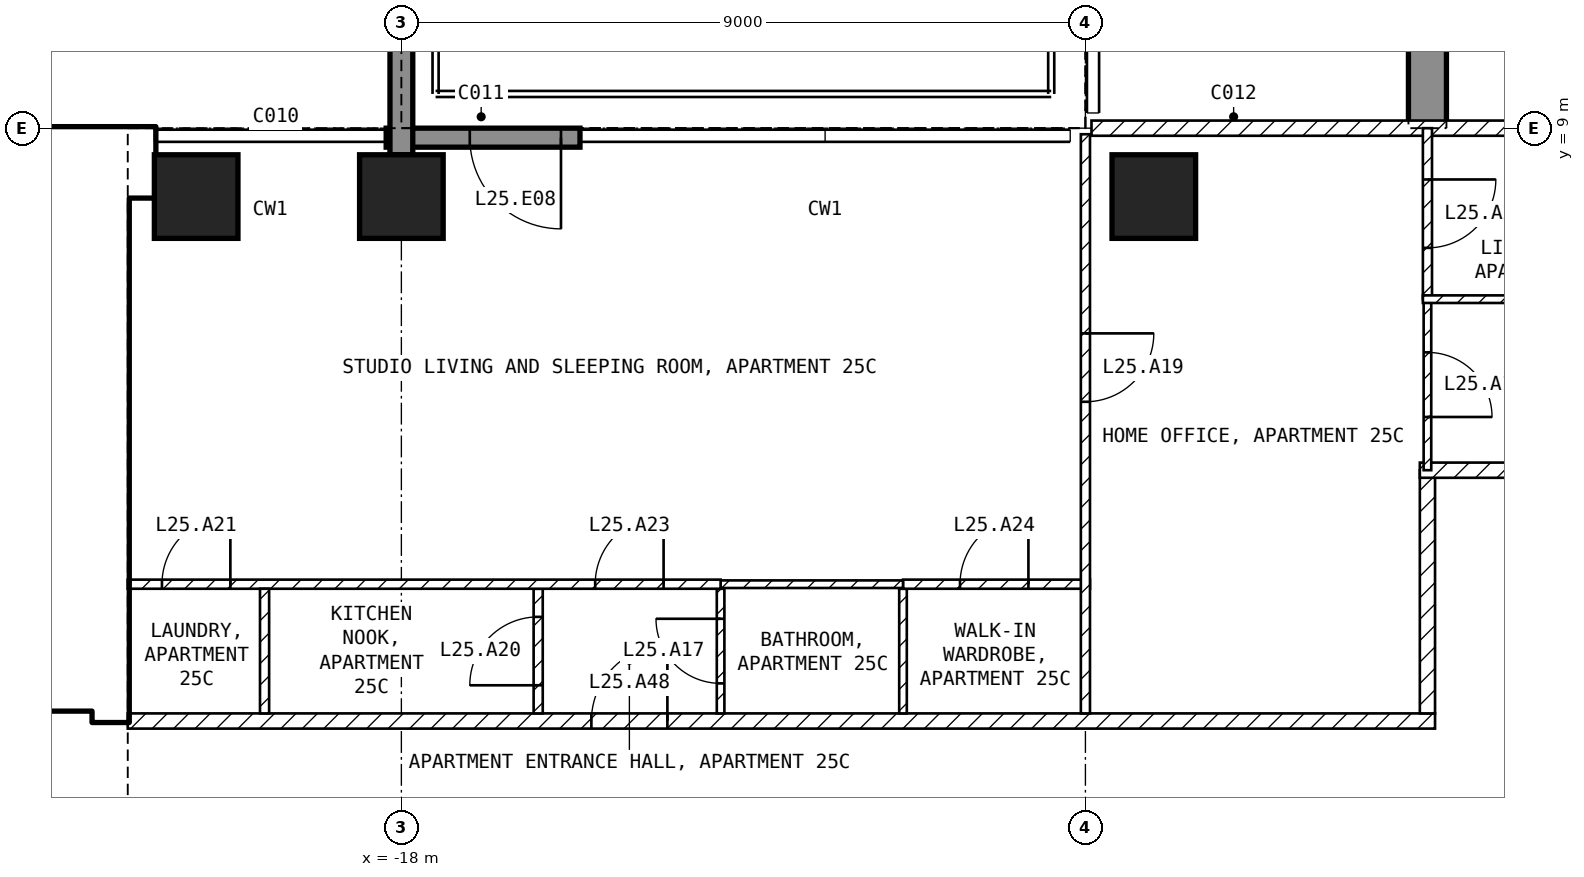
"""IFC4 building model, lengths in metres.
Left out: names, types, materials, properties, quantities, classifications, styles, units other than length and angle.
Written with IfcOpenShell. Run it as: python <this file> out.ifc"""

import sys

from ifc_helpers import new_model, si_unit, direction, frame, frame_2d, origin, origin_2d, place, context, subcontext, project, spatial, polyline, rectangle, outline, extrude, element, fill, save


model = new_model("IFC4")
c1 = context("Model", 3, precision=1e-05, world=origin(), true_north=direction((0.0, 1.0)))
c2 = subcontext(c1, "Body", "Model", "MODEL_VIEW")
j1 = project(units=[si_unit("LENGTHUNIT", "METRE"), si_unit("PLANEANGLEUNIT", "RADIAN")], contexts=[c1])
p1 = place(None, origin())
s1 = spatial("IfcSite", under=j1, at=p1, CompositionType="ELEMENT")
p2 = place(p1, origin())
s2 = spatial("IfcBuilding", under=s1, at=p2, CompositionType="ELEMENT")
p3 = place(p2, frame((0.0, 0.0, 109.4)))
s3 = spatial("IfcBuildingStorey", under=s2, at=p3, CompositionType="ELEMENT", Elevation=109.4)
for number, where, z_axis, x_axis in (
    (1, (-20.7, 8.1, -0.25), (0.0, 0.0, 1.0), (1.0, 0.0, 0.0)),
    (2, (-18.0, 8.1, -0.25), (0.0, 0.0, 1.0), (1.0, 0.0, 0.0)),
    (3, (-8.1, 8.1, -0.25), (0.0, 0.0, 1.0), (1.0, 0.0, 0.0)),
):
    element("IfcColumn", number, at=place(p3, frame(where, z_axis=z_axis, x_axis=x_axis)), inside=s3, PredefinedType="COLUMN", context=c2, shape_type="SweptSolid", body=[
        extrude(rectangle(XDim=1.1, YDim=1.1, at=origin_2d()), origin(), (0.0, 0.0, 1.0), 3.5),
    ])
p4 = place(p3, frame((-4.75, 9.0, -0.25), z_axis=(1.0, 0.0, 0.0), x_axis=(0.0, 1.0, 0.0)))
e4 = element("IfcWall", 4, at=p4, inside=s3, PredefinedType="SHEAR", context=c2, shape_type="SweptSolid", body=[
    extrude(outline(polyline([(0.0, 0.0), (2.1, 0.0), (2.1, 2.65), (4.5, 2.65), (4.5, 0.0), (9.9, 0.0), (9.9, 2.65), (12.3, 2.65), (12.3, 0.0), (16.55, 0.0), (16.55, 3.5), (0.0, 3.5), (0.0, 0.0)])), origin(), (0.0, 0.0, 1.0), 0.5),
])
p5 = place(p3, frame((-15.65, 8.875, 0.0), z_axis=(0.0, 0.0, 1.0), x_axis=(-1.0, 0.0, 0.0)))
e5 = element("IfcWall", 5, at=p5, inside=s3, PredefinedType="SOLIDWALL", context=c2, shape_type="SweptSolid", body=[
    extrude(rectangle(XDim=2.55, YDim=0.25, at=frame_2d((1.275, 0.0))), origin(), (0.0, 0.0, 1.0), 3.25),
])
p6 = place(p5, frame((0.25, 0.0, 0.0)))
e6 = element("IfcOpeningElement", 6, at=p6, cuts=e5, PredefinedType="OPENING", context=c2, shape_type="SweptSolid", body=[
    extrude(rectangle(XDim=1.2, YDim=2.4, at=frame_2d((0.6, 1.2))), frame((0.0, 0.135, 0.0), z_axis=(0.0, -1.0, 0.0), x_axis=(1.0, 0.0, 0.0)), (0.0, 0.0, 1.0), 0.27),
])
p7 = place(p3, frame((-18.0, 8.65, 0.0), z_axis=(0.0, 0.0, 1.0), x_axis=(0.0, 1.0, 0.0)))
e7 = element("IfcWall", 7, at=p7, inside=s3, PredefinedType="SOLIDWALL", context=c2, shape_type="SweptSolid", body=[
    extrude(rectangle(XDim=3.09, YDim=0.3, at=frame_2d((1.545, 0.0))), origin(), (0.0, 0.0, 1.0), 3.25),
])
p8 = place(p3, frame((-29.45, 8.55, 0.0), z_axis=(0.0, 0.0, 1.0), x_axis=(1.0, 0.0, 0.0)))
e8 = element("IfcWall", 8, at=p8, inside=s3, PredefinedType="SHEAR", context=c2, shape_type="SweptSolid", body=[
    extrude(rectangle(XDim=8.2, YDim=0.9, at=frame_2d((4.1, 0.0))), origin(), (0.0, 0.0, 1.0), 3.25),
])
p9 = place(p3, frame((-21.825, 1.2, 0.0), z_axis=(0.0, 0.0, 1.0), x_axis=(0.0, 1.0, 0.0)))
e9 = element("IfcWall", 9, at=p9, inside=s3, PredefinedType="SHEAR", context=c2, shape_type="SweptSolid", body=[
    extrude(rectangle(XDim=6.9, YDim=0.45, at=frame_2d((3.45, 0.0))), origin(), (0.0, 0.0, 1.0), 3.25),
])
p10 = place(p3, frame((-33.05, 1.45, 0.0), z_axis=(0.0, 0.0, 1.0), x_axis=(1.0, 0.0, 0.0)))
e10 = element("IfcWall", 10, at=p10, inside=s3, PredefinedType="SOLIDWALL", context=c2, shape_type="SweptSolid", body=[
    extrude(rectangle(XDim=11.0, YDim=0.2, at=frame_2d((5.5, 0.0))), origin(), (0.0, 0.0, 1.0), 3.25),
])
p11 = place(p10, frame((9.25, 0.0, 0.0)))
e11 = element("IfcOpeningElement", 11, at=p11, cuts=e10, PredefinedType="OPENING", context=c2, shape_type="SweptSolid", body=[
    extrude(rectangle(XDim=1.0, YDim=2.1, at=frame_2d((0.5, 1.05))), frame((0.0, 0.11, 0.0), z_axis=(0.0, -1.0, 0.0), x_axis=(1.0, 0.0, 0.0)), (0.0, 0.0, 1.0), 0.22),
])
p12 = place(p10, frame((6.75, 0.0, 0.0)))
e12 = element("IfcOpeningElement", 12, at=p12, cuts=e10, PredefinedType="OPENING", context=c2, shape_type="SweptSolid", body=[
    extrude(rectangle(XDim=1.0, YDim=2.1, at=frame_2d((0.5, 1.05))), frame((0.0, 0.11, 0.0), z_axis=(0.0, -1.0, 0.0), x_axis=(1.0, 0.0, 0.0)), (0.0, 0.0, 1.0), 0.22),
])
p13 = place(p10, frame((1.025, 0.0, 0.0)))
e13 = element("IfcOpeningElement", 13, at=p13, cuts=e10, PredefinedType="OPENING", context=c2, shape_type="SweptSolid", body=[
    extrude(rectangle(XDim=0.9, YDim=2.1, at=frame_2d((0.45, 1.05))), frame((0.0, 0.11, 0.0), z_axis=(0.0, -1.0, 0.0), x_axis=(1.0, 0.0, 0.0)), (0.0, 0.0, 1.0), 0.22),
])
p14 = place(p3, frame((-28.35, 5.15, 0.0), z_axis=(0.0, 0.0, 1.0), x_axis=(1.0, 0.0, 0.0)))
e14 = element("IfcWall", 14, at=p14, inside=s3, PredefinedType="SOLIDWALL", context=c2, shape_type="SweptSolid", body=[
    extrude(rectangle(XDim=6.3, YDim=0.2, at=frame_2d((3.15, 0.0))), origin(), (0.0, 0.0, 1.0), 3.25),
])
p15 = place(p14, frame((5.1, 0.0, 0.0)))
e15 = element("IfcOpeningElement", 15, at=p15, cuts=e14, PredefinedType="OPENING", context=c2, shape_type="SweptSolid", body=[
    extrude(rectangle(XDim=1.0, YDim=2.1, at=frame_2d((0.5, 1.05))), frame((0.0, 0.11, 0.0), z_axis=(0.0, -1.0, 0.0), x_axis=(1.0, 0.0, 0.0)), (0.0, 0.0, 1.0), 0.22),
])
p16 = place(p3, frame((-21.6, 1.2, 0.0), z_axis=(0.0, 0.0, 1.0), x_axis=(1.0, 0.0, 0.0)))
e16 = element("IfcWall", 16, at=p16, inside=s3, PredefinedType="PARTITIONING", context=c2, shape_type="SweptSolid", body=[
    extrude(rectangle(XDim=17.2, YDim=0.2, at=frame_2d((8.6, 0.0))), origin(), (0.0, 0.0, 1.0), 3.25),
])
p17 = place(p16, frame((6.1, 0.0, 0.0)))
e17 = element("IfcOpeningElement", 17, at=p17, cuts=e16, PredefinedType="OPENING", context=c2, shape_type="SweptSolid", body=[
    extrude(rectangle(XDim=1.0, YDim=2.1, at=frame_2d((0.5, 1.05))), frame((0.0, 0.11, 0.0), z_axis=(0.0, -1.0, 0.0), x_axis=(1.0, 0.0, 0.0)), (0.0, 0.0, 1.0), 0.22),
])
p18 = place(p3, frame((-4.5, 1.3, 0.0), z_axis=(0.0, 0.0, 1.0), x_axis=(0.0, 1.0, 0.0)))
e18 = element("IfcWall", 18, at=p18, inside=s3, PredefinedType="PARTITIONING", context=c2, shape_type="SweptSolid", body=[
    extrude(rectangle(XDim=3.2, YDim=0.2, at=frame_2d((1.6, 0.0))), origin(), (0.0, 0.0, 1.0), 3.25),
])
p19 = place(p3, frame((-4.6, 4.5, 0.0), z_axis=(0.0, 0.0, 1.0), x_axis=(1.0, 0.0, 0.0)))
e19 = element("IfcWall", 19, at=p19, inside=s3, PredefinedType="PARTITIONING", context=c2, shape_type="SweptSolid", body=[
    extrude(rectangle(XDim=3.5, YDim=0.2, at=frame_2d((1.75, 0.0))), origin(), (0.0, 0.0, 1.0), 3.25),
])
p20 = place(p3, frame((-8.92, 9.0, 0.0), z_axis=(0.0, 0.0, 1.0), x_axis=(1.0, 0.0, 0.0)))
e20 = element("IfcWall", 20, at=p20, inside=s3, PredefinedType="PARTITIONING", context=c2, shape_type="SweptSolid", body=[
    extrude(rectangle(XDim=17.84, YDim=0.2, at=frame_2d((8.92, 0.0))), origin(), (0.0, 0.0, 1.0), 3.25),
])
p21 = place(p20, frame((8.42, 0.0, 0.0)))
e21 = element("IfcOpeningElement", 21, at=p21, cuts=e20, PredefinedType="OPENING", context=c2, shape_type="SweptSolid", body=[
    extrude(rectangle(XDim=1.0, YDim=2.1, at=frame_2d((0.5, 1.05))), frame((0.0, 0.11, 0.0), z_axis=(0.0, -1.0, 0.0), x_axis=(1.0, 0.0, 0.0)), (0.0, 0.0, 1.0), 0.22),
])
p22 = place(p3, frame((-11.4, 1.3, 0.0), z_axis=(0.0, 0.0, 1.0), x_axis=(0.0, 1.0, 0.0)))
e22 = element("IfcWall", 22, at=p22, inside=s3, PredefinedType="PARTITIONING", context=c2, shape_type="SweptSolid", body=[
    extrude(rectangle(XDim=1.64, YDim=0.1, at=frame_2d((0.82, 0.0))), origin(), (0.0, 0.0, 1.0), 3.25),
])
p23 = place(p3, frame((-11.4, 3.0, 0.0), z_axis=(0.0, 0.0, 1.0), x_axis=(1.0, 0.0, 0.0)))
e23 = element("IfcWall", 23, at=p23, inside=s3, PredefinedType="PARTITIONING", context=c2, shape_type="SweptSolid", body=[
    extrude(rectangle(XDim=2.46, YDim=0.12, at=frame_2d((1.23, 0.0))), origin(), (0.0, 0.0, 1.0), 3.25),
])
p24 = place(p23, frame((0.75, 0.0, 0.0)))
e24 = element("IfcOpeningElement", 24, at=p24, cuts=e23, PredefinedType="OPENING", context=c2, shape_type="SweptSolid", body=[
    extrude(rectangle(XDim=0.9, YDim=2.1, at=frame_2d((0.45, 1.05))), frame((0.0, 0.07, 0.0), z_axis=(0.0, -1.0, 0.0), x_axis=(1.0, 0.0, 0.0)), (0.0, 0.0, 1.0), 0.14),
])
p25 = place(p3, frame((-9.0, 8.92, 0.0), z_axis=(0.0, 0.0, 1.0), x_axis=(0.0, -1.0, 0.0)))
e25 = element("IfcWall", 25, at=p25, inside=s3, PredefinedType="PARTITIONING", context=c2, shape_type="SweptSolid", body=[
    extrude(rectangle(XDim=7.62, YDim=0.12, at=frame_2d((3.81, 0.0))), origin(), (0.0, 0.0, 1.0), 3.25),
])
p26 = place(p25, frame((2.62, 0.0, 0.0)))
e26 = element("IfcOpeningElement", 26, at=p26, cuts=e25, PredefinedType="OPENING", context=c2, shape_type="SweptSolid", body=[
    extrude(rectangle(XDim=0.9, YDim=2.1, at=frame_2d((0.45, 1.05))), frame((0.0, 0.07, 0.0), z_axis=(0.0, -1.0, 0.0), x_axis=(1.0, 0.0, 0.0)), (0.0, 0.0, 1.0), 0.14),
])
p27 = place(p3, frame((-13.8, 1.3, 0.0), z_axis=(0.0, 0.0, 1.0), x_axis=(0.0, 1.0, 0.0)))
e27 = element("IfcWall", 27, at=p27, inside=s3, PredefinedType="PARTITIONING", context=c2, shape_type="SweptSolid", body=[
    extrude(rectangle(XDim=1.64, YDim=0.1, at=frame_2d((0.82, 0.0))), origin(), (0.0, 0.0, 1.0), 3.25),
])
p28 = place(p27, frame((0.395, 0.0, 0.0)))
e28 = element("IfcOpeningElement", 28, at=p28, cuts=e27, PredefinedType="OPENING", context=c2, shape_type="SweptSolid", body=[
    extrude(rectangle(XDim=0.85, YDim=2.1, at=frame_2d((0.425, 1.05))), frame((0.0, 0.06, 0.0), z_axis=(0.0, -1.0, 0.0), x_axis=(1.0, 0.0, 0.0)), (0.0, 0.0, 1.0), 0.12),
])
p29 = place(p3, frame((-13.8, 3.0, 0.0), z_axis=(0.0, 0.0, 1.0), x_axis=(1.0, 0.0, 0.0)))
e29 = element("IfcWall", 29, at=p29, inside=s3, PredefinedType="PARTITIONING", context=c2, shape_type="SweptSolid", body=[
    extrude(rectangle(XDim=2.4, YDim=0.1, at=frame_2d((1.2, 0.0))), origin(), (0.0, 0.0, 1.0), 3.25),
])
p30 = place(p3, frame((-16.2, 1.3, 0.0), z_axis=(0.0, 0.0, 1.0), x_axis=(0.0, 1.0, 0.0)))
e30 = element("IfcWall", 30, at=p30, inside=s3, PredefinedType="PARTITIONING", context=c2, shape_type="SweptSolid", body=[
    extrude(rectangle(XDim=1.64, YDim=0.12, at=frame_2d((0.82, 0.0))), origin(), (0.0, 0.0, 1.0), 3.25),
])
p31 = place(p30, frame((0.37, 0.0, 0.0)))
e31 = element("IfcOpeningElement", 31, at=p31, cuts=e30, PredefinedType="OPENING", context=c2, shape_type="SweptSolid", body=[
    extrude(rectangle(XDim=0.9, YDim=2.1, at=frame_2d((0.45, 1.05))), frame((0.0, 0.07, 0.0), z_axis=(0.0, -1.0, 0.0), x_axis=(1.0, 0.0, 0.0)), (0.0, 0.0, 1.0), 0.14),
])
p32 = place(p3, frame((-21.6, 3.0, 0.0), z_axis=(0.0, 0.0, 1.0), x_axis=(1.0, 0.0, 0.0)))
e32 = element("IfcWall", 32, at=p32, inside=s3, PredefinedType="PARTITIONING", context=c2, shape_type="SweptSolid", body=[
    extrude(rectangle(XDim=7.8, YDim=0.12, at=frame_2d((3.9, 0.0))), origin(), (0.0, 0.0, 1.0), 3.25),
])
p33 = place(p32, frame((0.45, 0.0, 0.0)))
e33 = element("IfcOpeningElement", 33, at=p33, cuts=e32, PredefinedType="OPENING", context=c2, shape_type="SweptSolid", body=[
    extrude(rectangle(XDim=0.9, YDim=2.1, at=frame_2d((0.45, 1.05))), frame((0.0, 0.07, 0.0), z_axis=(0.0, -1.0, 0.0), x_axis=(1.0, 0.0, 0.0)), (0.0, 0.0, 1.0), 0.14),
])
p34 = place(p32, frame((6.15, 0.0, 0.0)))
e34 = element("IfcOpeningElement", 34, at=p34, cuts=e32, PredefinedType="OPENING", context=c2, shape_type="SweptSolid", body=[
    extrude(rectangle(XDim=0.9, YDim=2.1, at=frame_2d((0.45, 1.05))), frame((0.0, 0.07, 0.0), z_axis=(0.0, -1.0, 0.0), x_axis=(1.0, 0.0, 0.0)), (0.0, 0.0, 1.0), 0.14),
])
p35 = place(p3, frame((-19.8, 1.3, 0.0), z_axis=(0.0, 0.0, 1.0), x_axis=(0.0, 1.0, 0.0)))
e35 = element("IfcWall", 35, at=p35, inside=s3, PredefinedType="PARTITIONING", context=c2, shape_type="SweptSolid", body=[
    extrude(rectangle(XDim=1.64, YDim=0.12, at=frame_2d((0.82, 0.0))), origin(), (0.0, 0.0, 1.0), 3.25),
])
p36 = place(p3, frame((-4.5, 6.75, 0.0), z_axis=(0.0, 0.0, 1.0), x_axis=(0.0, -1.0, 0.0)))
e36 = element("IfcWall", 36, at=p36, inside=s3, PredefinedType="PARTITIONING", context=c2, shape_type="SweptSolid", body=[
    extrude(rectangle(XDim=2.25, YDim=0.1, at=frame_2d((1.125, 0.0))), origin(), (0.0, 0.0, 1.0), 3.25),
])
p37 = place(p36, frame((0.7, 0.0, 0.0)))
e37 = element("IfcOpeningElement", 37, at=p37, cuts=e36, PredefinedType="OPENING", context=c2, shape_type="SweptSolid", body=[
    extrude(rectangle(XDim=0.85, YDim=2.1, at=frame_2d((0.425, 1.05))), frame((0.0, 0.06, 0.0), z_axis=(0.0, -1.0, 0.0), x_axis=(1.0, 0.0, 0.0)), (0.0, 0.0, 1.0), 0.12),
])
p38 = place(p3, frame((-4.5, 9.0, 0.0), z_axis=(0.0, 0.0, 1.0), x_axis=(0.0, -1.0, 0.0)))
e38 = element("IfcWall", 38, at=p38, inside=s3, PredefinedType="PARTITIONING", context=c2, shape_type="SweptSolid", body=[
    extrude(rectangle(XDim=2.25, YDim=0.12, at=frame_2d((1.125, 0.0))), origin(), (0.0, 0.0, 1.0), 3.25),
])
p39 = place(p38, frame((0.675, 0.0, 0.0)))
e39 = element("IfcOpeningElement", 39, at=p39, cuts=e38, PredefinedType="OPENING", context=c2, shape_type="SweptSolid", body=[
    extrude(rectangle(XDim=0.9, YDim=2.1, at=frame_2d((0.45, 1.05))), frame((0.0, 0.07, 0.0), z_axis=(0.0, -1.0, 0.0), x_axis=(1.0, 0.0, 0.0)), (0.0, 0.0, 1.0), 0.14),
])
p40 = place(p3, frame((-4.56, 6.75, 0.0), z_axis=(0.0, 0.0, 1.0), x_axis=(1.0, 0.0, 0.0)))
e40 = element("IfcWall", 40, at=p40, inside=s3, PredefinedType="PARTITIONING", context=c2, shape_type="SweptSolid", body=[
    extrude(rectangle(XDim=3.46, YDim=0.1, at=frame_2d((1.73, 0.0))), origin(), (0.0, 0.0, 1.0), 3.25),
])
p41 = place(p6, origin())
e41 = element("IfcDoor", 41, at=p41, inside=s3, OperationType="SINGLE_SWING_LEFT", PredefinedType="DOOR", context=c2, shape_type="SweptSolid", body=[
    extrude(rectangle(XDim=1.2, YDim=2.4, at=frame_2d((0.6, 1.2))), frame((0.0, 0.025, 0.0), z_axis=(0.0, -1.0, 0.0), x_axis=(1.0, 0.0, 0.0)), (0.0, 0.0, 1.0), 0.05),
])
fill(e6, e41)
p42 = place(p15, origin())
e42 = element("IfcDoor", 42, at=p42, inside=s3, OperationType="SINGLE_SWING_LEFT", PredefinedType="DOOR", context=c2, shape_type="SweptSolid", body=[
    extrude(rectangle(XDim=1.0, YDim=2.1, at=frame_2d((0.5, 1.05))), frame((0.0, 0.025, 0.0), z_axis=(0.0, -1.0, 0.0), x_axis=(1.0, 0.0, 0.0)), (0.0, 0.0, 1.0), 0.05),
])
fill(e15, e42)
p43 = place(p28, origin())
e43 = element("IfcDoor", 43, at=p43, inside=s3, OperationType="SINGLE_SWING_RIGHT", PredefinedType="DOOR", context=c2, shape_type="SweptSolid", body=[
    extrude(rectangle(XDim=0.85, YDim=2.1, at=frame_2d((0.425, 1.05))), frame((0.0, 0.025, 0.0), z_axis=(0.0, -1.0, 0.0), x_axis=(1.0, 0.0, 0.0)), (0.0, 0.0, 1.0), 0.05),
])
fill(e28, e43)
p44 = place(p37, origin())
e44 = element("IfcDoor", 44, at=p44, inside=s3, OperationType="SINGLE_SWING_RIGHT", PredefinedType="DOOR", context=c2, shape_type="SweptSolid", body=[
    extrude(rectangle(XDim=0.85, YDim=2.1, at=frame_2d((0.425, 1.05))), frame((0.0, 0.025, 0.0), z_axis=(0.0, -1.0, 0.0), x_axis=(1.0, 0.0, 0.0)), (0.0, 0.0, 1.0), 0.05),
])
fill(e37, e44)
p45 = place(p26, origin())
e45 = element("IfcDoor", 45, at=p45, inside=s3, OperationType="SINGLE_SWING_LEFT", PredefinedType="DOOR", context=c2, shape_type="SweptSolid", body=[
    extrude(rectangle(XDim=0.9, YDim=2.1, at=frame_2d((0.45, 1.05))), frame((0.0, 0.025, 0.0), z_axis=(0.0, -1.0, 0.0), x_axis=(1.0, 0.0, 0.0)), (0.0, 0.0, 1.0), 0.05),
])
fill(e26, e45)
p46 = place(p31, origin())
e46 = element("IfcDoor", 46, at=p46, inside=s3, OperationType="SINGLE_SWING_LEFT", PredefinedType="DOOR", context=c2, shape_type="SweptSolid", body=[
    extrude(rectangle(XDim=0.9, YDim=2.1, at=frame_2d((0.45, 1.05))), frame((0.0, 0.025, 0.0), z_axis=(0.0, -1.0, 0.0), x_axis=(1.0, 0.0, 0.0)), (0.0, 0.0, 1.0), 0.05),
])
fill(e31, e46)
p47 = place(p33, origin())
e47 = element("IfcDoor", 47, at=p47, inside=s3, OperationType="SINGLE_SWING_RIGHT", PredefinedType="DOOR", context=c2, shape_type="SweptSolid", body=[
    extrude(rectangle(XDim=0.9, YDim=2.1, at=frame_2d((0.45, 1.05))), frame((0.0, 0.025, 0.0), z_axis=(0.0, -1.0, 0.0), x_axis=(1.0, 0.0, 0.0)), (0.0, 0.0, 1.0), 0.05),
])
fill(e33, e47)
p48 = place(p39, origin())
e48 = element("IfcDoor", 48, at=p48, inside=s3, OperationType="SINGLE_SWING_LEFT", PredefinedType="DOOR", context=c2, shape_type="SweptSolid", body=[
    extrude(rectangle(XDim=0.9, YDim=2.1, at=frame_2d((0.45, 1.05))), frame((0.0, 0.025, 0.0), z_axis=(0.0, -1.0, 0.0), x_axis=(1.0, 0.0, 0.0)), (0.0, 0.0, 1.0), 0.05),
])
fill(e39, e48)
p49 = place(p34, origin())
e49 = element("IfcDoor", 49, at=p49, inside=s3, OperationType="SINGLE_SWING_RIGHT", PredefinedType="DOOR", context=c2, shape_type="SweptSolid", body=[
    extrude(rectangle(XDim=0.9, YDim=2.1, at=frame_2d((0.45, 1.05))), frame((0.0, 0.025, 0.0), z_axis=(0.0, -1.0, 0.0), x_axis=(1.0, 0.0, 0.0)), (0.0, 0.0, 1.0), 0.05),
])
fill(e34, e49)
p50 = place(p24, origin())
e50 = element("IfcDoor", 50, at=p50, inside=s3, OperationType="SINGLE_SWING_RIGHT", PredefinedType="DOOR", context=c2, shape_type="SweptSolid", body=[
    extrude(rectangle(XDim=0.9, YDim=2.1, at=frame_2d((0.45, 1.05))), frame((0.0, 0.025, 0.0), z_axis=(0.0, -1.0, 0.0), x_axis=(1.0, 0.0, 0.0)), (0.0, 0.0, 1.0), 0.05),
])
fill(e24, e50)
p51 = place(p17, origin())
e51 = element("IfcDoor", 51, at=p51, inside=s3, OperationType="SINGLE_SWING_RIGHT", PredefinedType="DOOR", context=c2, shape_type="SweptSolid", body=[
    extrude(rectangle(XDim=1.0, YDim=2.1, at=frame_2d((0.5, 1.05))), frame((0.0, 0.025, 0.0), z_axis=(0.0, -1.0, 0.0), x_axis=(1.0, 0.0, 0.0)), (0.0, 0.0, 1.0), 0.05),
])
fill(e17, e51)
save(model, sys.argv[1])
